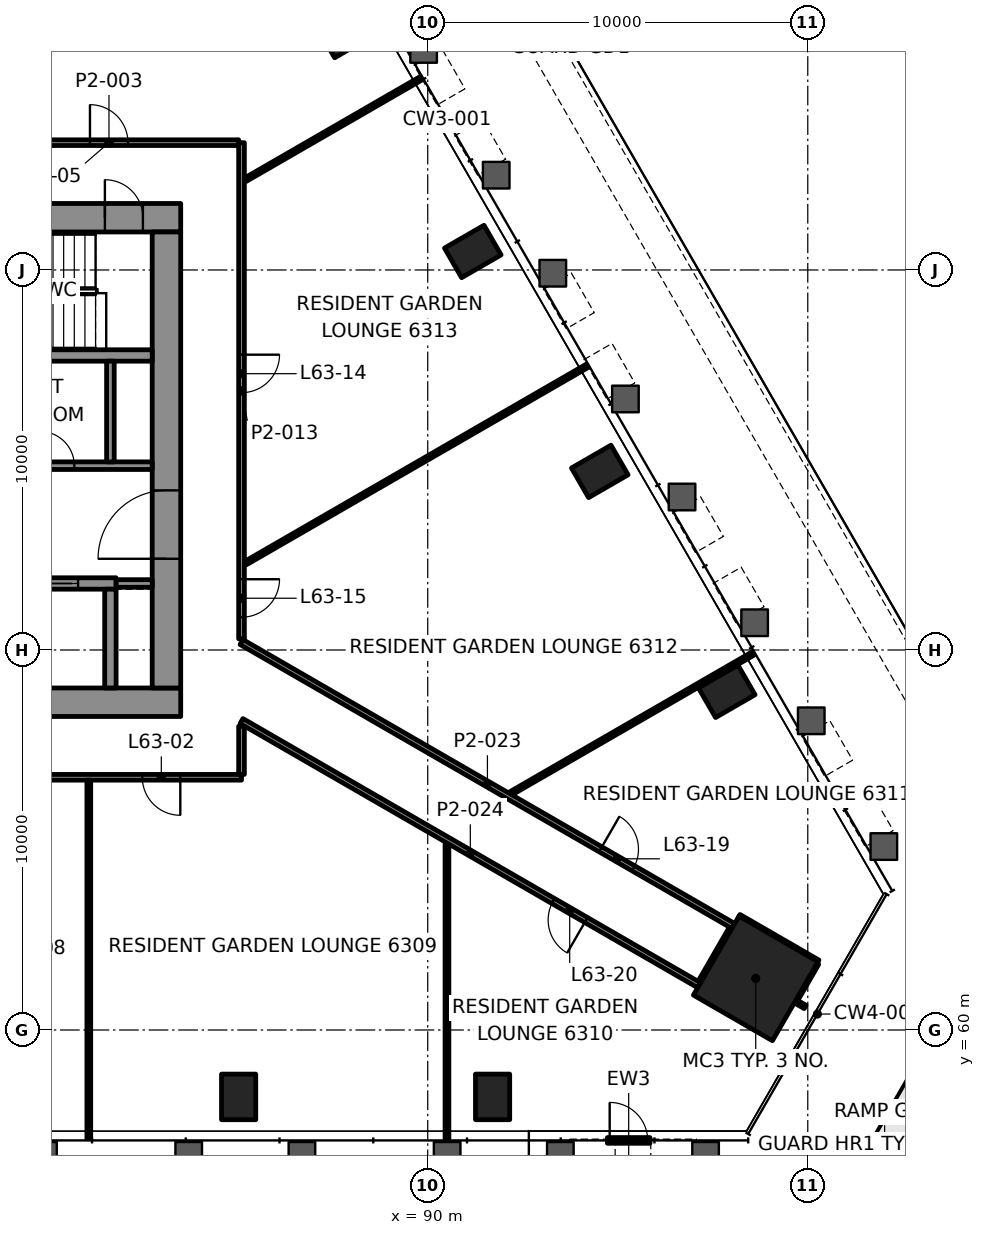
"""IFC4 building model, lengths in metres.
Left out: names, types, materials, properties, quantities, classifications, styles, units other than length and angle.
Written with IfcOpenShell. Run it as: python <this file> out.ifc"""

import sys

from ifc_helpers import new_model, si_unit, direction, frame, frame_2d, origin, origin_2d, place, context, subcontext, project, spatial, rectangle, hollow_rectangle, extrude, element, fill, save


model = new_model("IFC4")
c1 = context("Model", 3, precision=1e-05, world=origin(), true_north=direction((0.0, 1.0)))
c2 = subcontext(c1, "Body", "Model", "MODEL_VIEW")
j1 = project(units=[si_unit("LENGTHUNIT", "METRE"), si_unit("PLANEANGLEUNIT", "RADIAN")], contexts=[c1])
p1 = place(None, origin())
s1 = spatial("IfcSite", under=j1, at=p1, CompositionType="ELEMENT")
p2 = place(p1, origin())
s2 = spatial("IfcBuilding", under=s1, at=p2, CompositionType="ELEMENT")
p3 = place(p2, frame((0.0, 0.0, 267.1)))
s3 = spatial("IfcBuildingStorey", under=s2, at=p3, CompositionType="ELEMENT", Elevation=267.1)
p4 = place(p3, frame((98.63, 61.357, 0.0), z_axis=(0.0, 0.0, 1.0), x_axis=(0.5, 0.866025403784, 0.0)))
e1 = element("IfcColumn", 1, at=p4, inside=s3, PredefinedType="COLUMN", context=c2, shape_type="SweptSolid", body=[
    extrude(rectangle(XDim=2.4, YDim=2.4, at=origin_2d()), origin(), (0.0, 0.0, 1.0), 3.5),
])
for number, where, z_axis, x_axis in (
    (2, (85.024, 58.239, -0.0), (0.0, 0.0, 1.0), (1.0, 0.0, 0.0)),
    (3, (91.707, 58.239, -0.0), (0.0, 0.0, 1.0), (1.0, 0.0, 0.0)),
    (4, (97.869, 68.912, -0.0), (0.0, 0.0, 1.0), (-0.5, 0.866, 0.0)),
    (5, (94.527, 74.699, -0.0), (0.0, 0.0, 1.0), (-0.5, 0.866, 0.0)),
    (6, (91.186, 80.487, -0.0), (0.0, 0.0, 1.0), (-0.5, 0.866, 0.0)),
    (7, (87.844, 86.274, -0.0), (0.0, 0.0, 1.0), (-0.5, 0.866, 0.0)),
):
    element("IfcColumn", number, at=place(p3, frame(where, z_axis=z_axis, x_axis=x_axis)), inside=s3, PredefinedType="COLUMN", context=c2, shape_type="SweptSolid", body=[
        extrude(hollow_rectangle(XDim=0.9, YDim=1.2, WallThickness=0.06, at=origin_2d()), origin(), (0.0, 0.0, 1.0), 3.5),
    ])
p5 = place(p3, frame((66.5, 68.625, 0.0), z_axis=(0.0, 0.0, 1.0), x_axis=(1.0, 0.0, 0.0)))
e8 = element("IfcWall", 8, at=p5, inside=s3, PredefinedType="SHEAR", context=c2, shape_type="SweptSolid", body=[
    extrude(rectangle(XDim=17.0, YDim=0.75, at=frame_2d((8.5, 0.0))), origin(), (0.0, 0.0, 1.0), 3.3),
])
p6 = place(p5, frame((2.7, 0.0, 0.0)))
e9 = element("IfcOpeningElement", 9, at=p6, cuts=e8, PredefinedType="OPENING", context=c2, shape_type="SweptSolid", body=[
    extrude(rectangle(XDim=0.9, YDim=2.1, at=frame_2d((0.45, 1.05))), frame((0.0, 0.385, 0.0), z_axis=(0.0, -1.0, 0.0), x_axis=(1.0, 0.0, 0.0)), (0.0, 0.0, 1.0), 0.77),
])
p7 = place(p3, frame((66.5, 81.375, 0.0), z_axis=(0.0, 0.0, 1.0), x_axis=(1.0, 0.0, 0.0)))
e10 = element("IfcWall", 10, at=p7, inside=s3, PredefinedType="SHEAR", context=c2, shape_type="SweptSolid", body=[
    extrude(rectangle(XDim=17.0, YDim=0.75, at=frame_2d((8.5, 0.0))), origin(), (0.0, 0.0, 1.0), 3.3),
])
p8 = place(p7, frame((1.195, 0.0, 0.0)))
e11 = element("IfcOpeningElement", 11, at=p8, cuts=e10, PredefinedType="OPENING", context=c2, shape_type="SweptSolid", body=[
    extrude(rectangle(XDim=1.0, YDim=2.1, at=frame_2d((0.5, 1.05))), frame((0.0, 0.385, 0.0), z_axis=(0.0, -1.0, 0.0), x_axis=(1.0, 0.0, 0.0)), (0.0, 0.0, 1.0), 0.77),
])
p9 = place(p7, frame((15.005, 0.0, 0.0)))
e12 = element("IfcOpeningElement", 12, at=p9, cuts=e10, PredefinedType="OPENING", context=c2, shape_type="SweptSolid", body=[
    extrude(rectangle(XDim=1.0, YDim=2.1, at=frame_2d((0.5, 1.05))), frame((0.0, 0.385, 0.0), z_axis=(0.0, -1.0, 0.0), x_axis=(1.0, 0.0, 0.0)), (0.0, 0.0, 1.0), 0.77),
])
p10 = place(p7, frame((8.15, 0.0, 0.0)))
e13 = element("IfcOpeningElement", 13, at=p10, cuts=e10, PredefinedType="OPENING", context=c2, shape_type="SweptSolid", body=[
    extrude(rectangle(XDim=0.9, YDim=2.1, at=frame_2d((0.45, 1.05))), frame((0.0, 0.385, 0.0), z_axis=(0.0, -1.0, 0.0), x_axis=(1.0, 0.0, 0.0)), (0.0, 0.0, 1.0), 0.77),
])
p11 = place(p3, frame((83.125, 69.0, 0.0), z_axis=(0.0, 0.0, 1.0), x_axis=(0.0, 1.0, 0.0)))
e14 = element("IfcWall", 14, at=p11, inside=s3, PredefinedType="SHEAR", context=c2, shape_type="SweptSolid", body=[
    extrude(rectangle(XDim=12.0, YDim=0.75, at=frame_2d((6.0, 0.0))), origin(), (0.0, 0.0, 1.0), 3.3),
])
p12 = place(p11, frame((3.4, 0.0, 0.0)))
e15 = element("IfcOpeningElement", 15, at=p12, cuts=e14, PredefinedType="OPENING", context=c2, shape_type="SweptSolid", body=[
    extrude(rectangle(XDim=1.8, YDim=2.1, at=frame_2d((0.9, 1.05))), frame((0.0, 0.385, 0.0), z_axis=(0.0, -1.0, 0.0), x_axis=(1.0, 0.0, 0.0)), (0.0, 0.0, 1.0), 0.77),
])
p13 = place(p3, frame((70.3, 71.75, 0.0), z_axis=(0.0, 0.0, 1.0), x_axis=(1.0, 0.0, 0.0)))
e16 = element("IfcWall", 16, at=p13, inside=s3, PredefinedType="SHEAR", context=c2, shape_type="SweptSolid", body=[
    extrude(rectangle(XDim=11.5, YDim=0.3, at=frame_2d((5.75, 0.0))), origin(), (0.0, 0.0, 1.0), 3.3),
])
p14 = place(p13, frame((1.0, 0.0, 0.0)))
e17 = element("IfcOpeningElement", 17, at=p14, cuts=e16, PredefinedType="OPENING", context=c2, shape_type="SweptSolid", body=[
    extrude(rectangle(XDim=1.1, YDim=2.1, at=frame_2d((0.55, 1.05))), frame((0.0, 0.16, 0.0), z_axis=(0.0, -1.0, 0.0), x_axis=(1.0, 0.0, 0.0)), (0.0, 0.0, 1.0), 0.32),
])
p15 = place(p13, frame((3.8, 0.0, 0.0)))
e18 = element("IfcOpeningElement", 18, at=p15, cuts=e16, PredefinedType="OPENING", context=c2, shape_type="SweptSolid", body=[
    extrude(rectangle(XDim=1.1, YDim=2.1, at=frame_2d((0.55, 1.05))), frame((0.0, 0.16, 0.0), z_axis=(0.0, -1.0, 0.0), x_axis=(1.0, 0.0, 0.0)), (0.0, 0.0, 1.0), 0.32),
])
p16 = place(p13, frame((6.6, 0.0, 0.0)))
e19 = element("IfcOpeningElement", 19, at=p16, cuts=e16, PredefinedType="OPENING", context=c2, shape_type="SweptSolid", body=[
    extrude(rectangle(XDim=1.1, YDim=2.1, at=frame_2d((0.55, 1.05))), frame((0.0, 0.16, 0.0), z_axis=(0.0, -1.0, 0.0), x_axis=(1.0, 0.0, 0.0)), (0.0, 0.0, 1.0), 0.32),
])
p17 = place(p13, frame((9.4, 0.0, 0.0)))
e20 = element("IfcOpeningElement", 20, at=p17, cuts=e16, PredefinedType="OPENING", context=c2, shape_type="SweptSolid", body=[
    extrude(rectangle(XDim=1.1, YDim=2.1, at=frame_2d((0.55, 1.05))), frame((0.0, 0.16, 0.0), z_axis=(0.0, -1.0, 0.0), x_axis=(1.0, 0.0, 0.0)), (0.0, 0.0, 1.0), 0.32),
])
p18 = place(p3, frame((81.65, 69.0, 0.0), z_axis=(0.0, 0.0, 1.0), x_axis=(0.0, 1.0, 0.0)))
e21 = element("IfcWall", 21, at=p18, inside=s3, PredefinedType="SHEAR", context=c2, shape_type="SweptSolid", body=[
    extrude(rectangle(XDim=2.6, YDim=0.3, at=frame_2d((1.3, 0.0))), origin(), (0.0, 0.0, 1.0), 3.3),
])
p19 = place(p3, frame((67.25, 77.75, 0.0), z_axis=(0.0, 0.0, 1.0), x_axis=(1.0, 0.0, 0.0)))
e22 = element("IfcWall", 22, at=p19, inside=s3, PredefinedType="SHEAR", context=c2, shape_type="SweptSolid", body=[
    extrude(rectangle(XDim=15.5, YDim=0.3, at=frame_2d((7.75, 0.0))), origin(), (0.0, 0.0, 1.0), 3.3),
])
p20 = place(p19, frame((0.445, 0.0, 0.0)))
e23 = element("IfcOpeningElement", 23, at=p20, cuts=e22, PredefinedType="OPENING", context=c2, shape_type="SweptSolid", body=[
    extrude(rectangle(XDim=1.0, YDim=2.1, at=frame_2d((0.5, 1.05))), frame((0.0, 0.16, 0.0), z_axis=(0.0, -1.0, 0.0), x_axis=(1.0, 0.0, 0.0)), (0.0, 0.0, 1.0), 0.32),
])
p21 = place(p3, frame((85.1, 66.65, 0.0), z_axis=(0.0, 0.0, 1.0), x_axis=(-1.0, 0.0, 0.0)))
e24 = element("IfcWall", 24, at=p21, inside=s3, PredefinedType="PARTITIONING", context=c2, shape_type="SweptSolid", body=[
    extrude(rectangle(XDim=20.2, YDim=0.15, at=frame_2d((10.1, 0.0))), origin(), (0.0, 0.0, 1.0), 2.7),
])
p22 = place(p21, frame((1.61, 0.0, 0.0)))
e25 = element("IfcOpeningElement", 25, at=p22, cuts=e24, PredefinedType="OPENING", context=c2, shape_type="SweptSolid", body=[
    extrude(rectangle(XDim=1.0, YDim=2.1, at=frame_2d((0.5, 1.05))), frame((0.0, 0.085, 0.0), z_axis=(0.0, -1.0, 0.0), x_axis=(1.0, 0.0, 0.0)), (0.0, 0.0, 1.0), 0.17),
])
p23 = place(p21, frame((8.229, 0.0, 0.0)))
e26 = element("IfcOpeningElement", 26, at=p23, cuts=e24, PredefinedType="OPENING", context=c2, shape_type="SweptSolid", body=[
    extrude(rectangle(XDim=1.0, YDim=2.1, at=frame_2d((0.5, 1.05))), frame((0.0, 0.085, 0.0), z_axis=(0.0, -1.0, 0.0), x_axis=(1.0, 0.0, 0.0)), (0.0, 0.0, 1.0), 0.17),
])
p24 = place(p3, frame((78.2, 83.35, 0.0), z_axis=(0.0, 0.0, 1.0), x_axis=(1.0, 0.0, 0.0)))
e27 = element("IfcWall", 27, at=p24, inside=s3, PredefinedType="PARTITIONING", context=c2, shape_type="SweptSolid", body=[
    extrude(rectangle(XDim=6.824, YDim=0.15, at=frame_2d((3.412, 0.0))), origin(), (0.0, 0.0, 1.0), 2.7),
])
p25 = place(p24, frame((2.912, 0.0, 0.0)))
e28 = element("IfcOpeningElement", 28, at=p25, cuts=e27, PredefinedType="OPENING", context=c2, shape_type="SweptSolid", body=[
    extrude(rectangle(XDim=1.0, YDim=2.1, at=frame_2d((0.5, 1.05))), frame((0.0, 0.085, 0.0), z_axis=(0.0, -1.0, 0.0), x_axis=(1.0, 0.0, 0.0)), (0.0, 0.0, 1.0), 0.17),
])
p26 = place(p3, frame((92.192, 66.23, 0.0), z_axis=(0.0, 0.0, 1.0), x_axis=(0.866026984066, 0.499997262862, 0.0)))
e29 = element("IfcWall", 29, at=p26, inside=s3, PredefinedType="PARTITIONING", context=c2, shape_type="SweptSolid", body=[
    extrude(rectangle(XDim=7.357, YDim=0.1, at=frame_2d((3.678, 0.0))), origin(), (0.0, 0.0, 1.0), 2.688),
])
p27 = place(p3, frame((85.201, 72.284, 0.0), z_axis=(0.0, 0.0, 1.0), x_axis=(0.866018018137, 0.500012792098, 0.0)))
e30 = element("IfcWall", 30, at=p27, inside=s3, PredefinedType="PARTITIONING", context=c2, shape_type="SweptSolid", body=[
    extrude(rectangle(XDim=10.385, YDim=0.1, at=frame_2d((5.192, 0.0))), origin(), (0.0, 0.0, 1.0), 2.688),
])
p28 = place(p3, frame((85.201, 82.375, 0.0), z_axis=(0.0, 0.0, 1.0), x_axis=(0.866025682925, 0.499999516514, 0.0)))
e31 = element("IfcWall", 31, at=p28, inside=s3, PredefinedType="PARTITIONING", context=c2, shape_type="SweptSolid", body=[
    extrude(rectangle(XDim=5.339, YDim=0.1, at=frame_2d((2.67, 0.0))), origin(), (0.0, 0.0, 1.0), 2.688),
])
p29 = place(p3, frame((99.67, 60.757, 0.0), z_axis=(0.0, 0.0, 1.0), x_axis=(0.500022773673, 0.866012254999, 0.0)))
e32 = element("IfcWall", 32, at=p29, inside=s3, PredefinedType="PARTITIONING", context=c2, shape_type="SweptSolid", body=[
    extrude(rectangle(XDim=1.149, YDim=0.1, at=frame_2d((0.575, 0.0))), origin(), (0.0, 0.0, 1.0), 2.7),
])
p30 = place(p3, frame((97.179, 61.243, 0.0), z_axis=(0.0, 0.0, 1.0), x_axis=(0.499988108725, 0.866032269107, 0.0)))
e33 = element("IfcWall", 33, at=p30, inside=s3, PredefinedType="PARTITIONING", context=c2, shape_type="SweptSolid", body=[
    extrude(rectangle(XDim=1.644, YDim=0.15, at=frame_2d((0.822, 0.0))), origin(), (0.0, 0.0, 1.0), 2.547),
])
p31 = place(p3, frame((90.506, 57.139, 0.0), z_axis=(0.0, 0.0, 1.0), x_axis=(0.0, 1.0, 0.0)))
e34 = element("IfcWall", 34, at=p31, inside=s3, PredefinedType="PARTITIONING", context=c2, shape_type="SweptSolid", body=[
    extrude(rectangle(XDim=7.753, YDim=0.1, at=frame_2d((3.876, 0.0))), origin(), (0.0, 0.0, 1.0), 2.7),
])
p32 = place(p3, frame((85.1, 66.726, 0.0), z_axis=(0.0, 0.0, 1.0), x_axis=(0.0, 1.0, 0.0)))
e35 = element("IfcWall", 35, at=p32, inside=s3, PredefinedType="PARTITIONING", context=c2, shape_type="SweptSolid", body=[
    extrude(rectangle(XDim=1.267, YDim=0.15, at=frame_2d((0.634, 0.0))), origin(), (0.0, 0.0, 1.0), 2.547),
])
p33 = place(p3, frame((85.1, 83.35, 0.0), z_axis=(0.0, 0.0, 1.0), x_axis=(0.0, -1.0, 0.0)))
e36 = element("IfcWall", 36, at=p33, inside=s3, PredefinedType="PARTITIONING", context=c2, shape_type="SweptSolid", body=[
    extrude(rectangle(XDim=13.055, YDim=0.15, at=frame_2d((6.527, 0.0))), origin(), (0.0, 0.0, 1.0), 2.7),
])
p34 = place(p33, frame((5.579, 0.0, 0.0)))
e37 = element("IfcOpeningElement", 37, at=p34, cuts=e36, PredefinedType="OPENING", context=c2, shape_type="SweptSolid", body=[
    extrude(rectangle(XDim=1.0, YDim=2.1, at=frame_2d((0.5, 1.05))), frame((0.0, 0.085, 0.0), z_axis=(0.0, -1.0, 0.0), x_axis=(1.0, 0.0, 0.0)), (0.0, 0.0, 1.0), 0.17),
])
p35 = place(p33, frame((11.488, 0.0, 0.0)))
e38 = element("IfcOpeningElement", 38, at=p35, cuts=e36, PredefinedType="OPENING", context=c2, shape_type="SweptSolid", body=[
    extrude(rectangle(XDim=1.0, YDim=2.1, at=frame_2d((0.5, 1.05))), frame((0.0, 0.085, 0.0), z_axis=(0.0, -1.0, 0.0), x_axis=(1.0, 0.0, 0.0)), (0.0, 0.0, 1.0), 0.17),
])
p36 = place(p3, frame((81.082, 57.139, 0.0), z_axis=(0.0, 0.0, 1.0), x_axis=(0.0, 1.0, 0.0)))
e39 = element("IfcWall", 39, at=p36, inside=s3, PredefinedType="PARTITIONING", context=c2, shape_type="SweptSolid", body=[
    extrude(rectangle(XDim=9.436, YDim=0.1, at=frame_2d((4.718, 0.0))), origin(), (0.0, 0.0, 1.0), 2.688),
])
p37 = place(p3, frame((100.269, 61.796, 0.0), z_axis=(0.0, 0.0, 1.0), x_axis=(-0.865992388649, 0.500057179532, 0.0)))
e40 = element("IfcWall", 40, at=p37, inside=s3, PredefinedType="PARTITIONING", context=c2, shape_type="SweptSolid", body=[
    extrude(rectangle(XDim=2.399, YDim=0.1, at=frame_2d((1.2, 0.0))), origin(), (0.0, 0.0, 1.0), 2.7),
])
p38 = place(p3, frame((85.1, 70.208, 0.0), z_axis=(0.0, 0.0, 1.0), x_axis=(0.866022614424, -0.500004831283, 0.0)))
e41 = element("IfcWall", 41, at=p38, inside=s3, PredefinedType="PARTITIONING", context=c2, shape_type="SweptSolid", body=[
    extrude(rectangle(XDim=14.943, YDim=0.15, at=frame_2d((7.472, 0.0))), origin(), (0.0, 0.0, 1.0), 2.7),
])
p39 = place(p38, frame((10.906, 0.0, 0.0)))
e42 = element("IfcOpeningElement", 42, at=p39, cuts=e41, PredefinedType="OPENING", context=c2, shape_type="SweptSolid", body=[
    extrude(rectangle(XDim=1.0, YDim=2.1, at=frame_2d((0.5, 1.05))), frame((0.0, 0.085, 0.0), z_axis=(0.0, -1.0, 0.0), x_axis=(1.0, 0.0, 0.0)), (0.0, 0.0, 1.0), 0.17),
])
p40 = place(p3, frame((99.929, 60.607, 0.0), z_axis=(0.0, 0.0, 1.0), x_axis=(-0.865827443207, 0.500342721131, 0.0)))
e43 = element("IfcWall", 43, at=p40, inside=s3, PredefinedType="PARTITIONING", context=c2, shape_type="SweptSolid", body=[
    extrude(rectangle(XDim=0.25, YDim=0.1, at=frame_2d((0.125, 0.0))), origin(), (0.0, 0.0, 1.0), 2.7),
])
p41 = place(p3, frame((97.141, 61.178, 0.0), z_axis=(0.0, 0.0, 1.0), x_axis=(-0.866020369651, 0.500008719273, 0.0)))
e44 = element("IfcWall", 44, at=p41, inside=s3, PredefinedType="PARTITIONING", context=c2, shape_type="SweptSolid", body=[
    extrude(rectangle(XDim=13.904, YDim=0.15, at=frame_2d((6.952, 0.0))), origin(), (0.0, 0.0, 1.0), 2.547),
])
p42 = place(p41, frame((3.432, 0.0, 0.0)))
e45 = element("IfcOpeningElement", 45, at=p42, cuts=e44, PredefinedType="OPENING", context=c2, shape_type="SweptSolid", body=[
    extrude(rectangle(XDim=1.0, YDim=2.1, at=frame_2d((0.5, 1.05))), frame((0.0, 0.085, 0.0), z_axis=(0.0, -1.0, 0.0), x_axis=(1.0, 0.0, 0.0)), (0.0, 0.0, 1.0), 0.17),
])
p43 = place(p3, frame((105.682, 64.079, 0.0), z_axis=(0.0, 0.0, 1.0), x_axis=(-0.500001689899, 0.866024428119, 0.0)))
e46 = element("IfcWall", 46, at=p43, inside=s3, PredefinedType="SOLIDWALL", context=c2, shape_type="SweptSolid", body=[
    extrude(rectangle(XDim=49.597, YDim=0.8, at=frame_2d((24.799, 0.0))), origin(), (0.0, 0.0, 1.0), 0.9),
])
p44 = place(p3, frame((81.8, 71.75, 0.0), z_axis=(0.0, 0.0, 1.0), x_axis=(1.0, 0.0, 0.0)))
e47 = element("IfcWall", 47, at=p44, inside=s3, PredefinedType="PARTITIONING", context=c2, shape_type="SweptSolid", body=[
    extrude(rectangle(XDim=0.95, YDim=0.2, at=frame_2d((0.475, 0.0))), origin(), (0.0, 0.0, 1.0), 3.3),
])
p45 = place(p3, frame((76.2, 74.85, 0.0), z_axis=(0.0, 0.0, 1.0), x_axis=(1.0, 0.0, 0.0)))
e48 = element("IfcWall", 48, at=p45, inside=s3, PredefinedType="PARTITIONING", context=c2, shape_type="SweptSolid", body=[
    extrude(rectangle(XDim=6.55, YDim=0.2, at=frame_2d((3.275, 0.0))), origin(), (0.0, 0.0, 1.0), 3.3),
])
p46 = place(p45, frame((0.8, 0.0, 0.0)))
e49 = element("IfcOpeningElement", 49, at=p46, cuts=e48, PredefinedType="OPENING", context=c2, shape_type="SweptSolid", body=[
    extrude(rectangle(XDim=0.9, YDim=2.1, at=frame_2d((0.45, 1.05))), frame((0.0, 0.11, 0.0), z_axis=(0.0, -1.0, 0.0), x_axis=(1.0, 0.0, 0.0)), (0.0, 0.0, 1.0), 0.22),
])
p47 = place(p45, frame((3.6, 0.0, 0.0)))
e50 = element("IfcOpeningElement", 50, at=p47, cuts=e48, PredefinedType="OPENING", context=c2, shape_type="SweptSolid", body=[
    extrude(rectangle(XDim=0.9, YDim=2.1, at=frame_2d((0.45, 1.05))), frame((0.0, 0.11, 0.0), z_axis=(0.0, -1.0, 0.0), x_axis=(1.0, 0.0, 0.0)), (0.0, 0.0, 1.0), 0.22),
])
p48 = place(p3, frame((81.65, 74.95, 0.0), z_axis=(0.0, 0.0, 1.0), x_axis=(0.0, 1.0, 0.0)))
e51 = element("IfcWall", 51, at=p48, inside=s3, PredefinedType="PARTITIONING", context=c2, shape_type="SweptSolid", body=[
    extrude(rectangle(XDim=2.65, YDim=0.2, at=frame_2d((1.325, 0.0))), origin(), (0.0, 0.0, 1.0), 3.3),
])
p49 = place(p22, origin())
e52 = element("IfcDoor", 52, at=p49, inside=s3, OperationType="SINGLE_SWING_LEFT", PredefinedType="DOOR", context=c2, shape_type="SweptSolid", body=[
    extrude(rectangle(XDim=1.0, YDim=2.1, at=frame_2d((0.5, 1.05))), frame((0.0, 0.025, 0.0), z_axis=(0.0, -1.0, 0.0), x_axis=(1.0, 0.0, 0.0)), (0.0, 0.0, 1.0), 0.05),
])
fill(e25, e52)
p50 = place(p25, origin())
e53 = element("IfcDoor", 53, at=p50, inside=s3, OperationType="SINGLE_SWING_LEFT", PredefinedType="DOOR", context=c2, shape_type="SweptSolid", body=[
    extrude(rectangle(XDim=1.0, YDim=2.1, at=frame_2d((0.5, 1.05))), frame((0.0, 0.025, 0.0), z_axis=(0.0, -1.0, 0.0), x_axis=(1.0, 0.0, 0.0)), (0.0, 0.0, 1.0), 0.05),
])
fill(e28, e53)
p51 = place(p34, origin())
e54 = element("IfcDoor", 54, at=p51, inside=s3, OperationType="SINGLE_SWING_LEFT", PredefinedType="DOOR", context=c2, shape_type="SweptSolid", body=[
    extrude(rectangle(XDim=1.0, YDim=2.1, at=frame_2d((0.5, 1.05))), frame((0.0, 0.025, 0.0), z_axis=(0.0, -1.0, 0.0), x_axis=(1.0, 0.0, 0.0)), (0.0, 0.0, 1.0), 0.05),
])
fill(e37, e54)
p52 = place(p35, origin())
e55 = element("IfcDoor", 55, at=p52, inside=s3, OperationType="SINGLE_SWING_RIGHT", PredefinedType="DOOR", context=c2, shape_type="SweptSolid", body=[
    extrude(rectangle(XDim=1.0, YDim=2.1, at=frame_2d((0.5, 1.05))), frame((0.0, 0.025, 0.0), z_axis=(0.0, -1.0, 0.0), x_axis=(1.0, 0.0, 0.0)), (0.0, 0.0, 1.0), 0.05),
])
fill(e38, e55)
p53 = place(p39, origin())
e56 = element("IfcDoor", 56, at=p53, inside=s3, OperationType="SINGLE_SWING_LEFT", PredefinedType="DOOR", context=c2, shape_type="SweptSolid", body=[
    extrude(rectangle(XDim=1.0, YDim=2.1, at=frame_2d((0.5, 1.05))), frame((0.0, 0.025, 0.0), z_axis=(0.0, -1.0, 0.0), x_axis=(1.0, 0.0, 0.0)), (0.0, 0.0, 1.0), 0.05),
])
fill(e42, e56)
p54 = place(p42, origin())
e57 = element("IfcDoor", 57, at=p54, inside=s3, OperationType="SINGLE_SWING_LEFT", PredefinedType="DOOR", context=c2, shape_type="SweptSolid", body=[
    extrude(rectangle(XDim=1.0, YDim=2.1, at=frame_2d((0.5, 1.05))), frame((0.0, 0.025, 0.0), z_axis=(0.0, -1.0, 0.0), x_axis=(1.0, 0.0, 0.0)), (0.0, 0.0, 1.0), 0.05),
])
fill(e45, e57)
p55 = place(p3, frame((94.728, 57.094, 0.0), z_axis=(0.0, 0.0, 1.0), x_axis=(1.0, 0.0, 0.0)))
p56 = place(p55, frame((0.06, 0.0, 0.0)))
p57 = place(p56, origin())
e58 = element("IfcDoor", 58, at=p57, inside=s3, OperationType="SINGLE_SWING_LEFT", PredefinedType="DOOR", context=c2, shape_type="SweptSolid", body=[
    extrude(rectangle(XDim=1.0, YDim=2.1, at=frame_2d((0.5, 1.05))), frame((0.0, 0.025, 0.0), z_axis=(0.0, -1.0, 0.0), x_axis=(1.0, 0.0, 0.0)), (0.0, 0.0, 1.0), 0.05),
])
p58 = place(p17, origin())
e59 = element("IfcDoor", 59, at=p58, inside=s3, OperationType="DOUBLE_DOOR_SLIDING", PredefinedType="DOOR", context=c2, shape_type="SweptSolid", body=[
    extrude(rectangle(XDim=1.1, YDim=2.1, at=frame_2d((0.55, 1.05))), frame((0.0, 0.025, 0.0), z_axis=(0.0, -1.0, 0.0), x_axis=(1.0, 0.0, 0.0)), (0.0, 0.0, 1.0), 0.05),
])
fill(e20, e59)
p59 = place(p9, origin())
e60 = element("IfcDoor", 60, at=p59, inside=s3, OperationType="SINGLE_SWING_LEFT", PredefinedType="DOOR", context=c2, shape_type="SweptSolid", body=[
    extrude(rectangle(XDim=1.0, YDim=2.1, at=frame_2d((0.5, 1.05))), frame((0.0, 0.095, 0.0), z_axis=(0.0, -1.0, 0.0), x_axis=(1.0, 0.0, 0.0)), (0.0, 0.0, 1.0), 0.19),
])
fill(e12, e60)
p60 = place(p12, origin())
e61 = element("IfcDoor", 61, at=p60, inside=s3, OperationType="SINGLE_SWING_LEFT", PredefinedType="DOOR", context=c2, shape_type="SweptSolid", body=[
    extrude(rectangle(XDim=1.8, YDim=2.1, at=frame_2d((0.9, 1.05))), frame((0.0, 0.095, 0.0), z_axis=(0.0, -1.0, 0.0), x_axis=(1.0, 0.0, 0.0)), (0.0, 0.0, 1.0), 0.19),
])
fill(e15, e61)
p61 = place(p47, origin())
e62 = element("IfcDoor", 62, at=p61, inside=s3, OperationType="SINGLE_SWING_LEFT", PredefinedType="DOOR", context=c2, shape_type="SweptSolid", body=[
    extrude(rectangle(XDim=0.9, YDim=2.1, at=frame_2d((0.45, 1.05))), frame((0.0, 0.025, 0.0), z_axis=(0.0, -1.0, 0.0), x_axis=(1.0, 0.0, 0.0)), (0.0, 0.0, 1.0), 0.05),
])
fill(e50, e62)
save(model, sys.argv[1])
